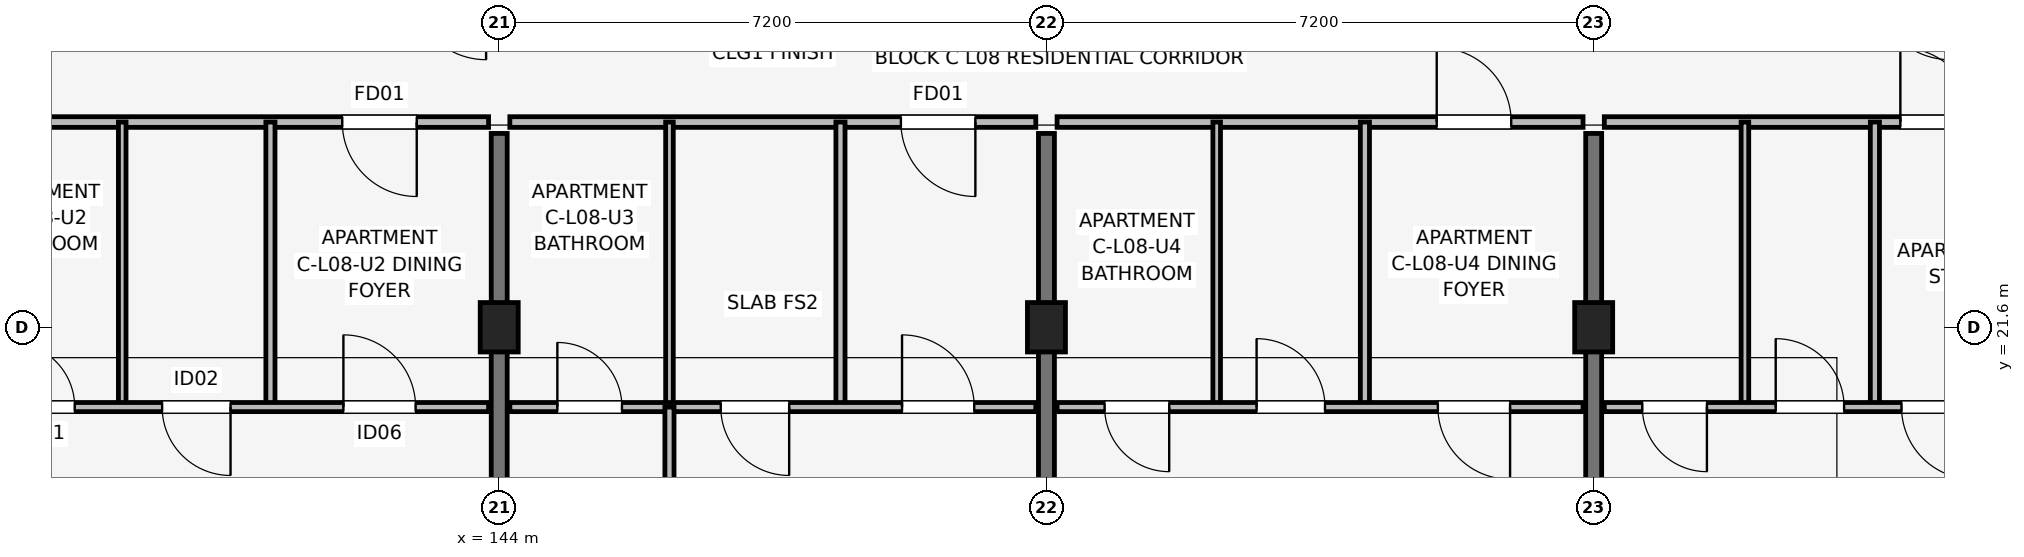
"""IFC4 building model, lengths in metres.
Left out: names, types, materials, properties, quantities, classifications, styles, units other than length and angle.
Written with IfcOpenShell. Run it as: python <this file> out.ifc"""

import sys

from ifc_helpers import new_model, si_unit, direction, frame, frame_2d, origin, origin_2d, place, context, subcontext, project, spatial, rectangle, extrude, element, fill, save


model = new_model("IFC4")
c1 = context("Model", 3, precision=1e-05, world=origin(), true_north=direction((0.0, 1.0)))
c2 = subcontext(c1, "Body", "Model", "MODEL_VIEW")
j1 = project(units=[si_unit("LENGTHUNIT", "METRE"), si_unit("PLANEANGLEUNIT", "RADIAN")], contexts=[c1])
p1 = place(None, origin())
s1 = spatial("IfcSite", under=j1, at=p1, CompositionType="ELEMENT")
p2 = place(p1, origin())
s2 = spatial("IfcBuilding", under=s1, at=p2, CompositionType="ELEMENT")
p3 = place(p2, frame((0.0, 0.0, 27.6)))
s3 = spatial("IfcBuildingStorey", under=s2, at=p3, CompositionType="ELEMENT", Elevation=27.6)
for number, where, z_axis, x_axis in (
    (1, (144.0, 21.6, 0.0), (0.0, 0.0, 1.0), (1.0, 0.0, 0.0)),
    (2, (151.2, 21.6, 0.0), (0.0, 0.0, 1.0), (1.0, 0.0, 0.0)),
    (3, (158.4, 21.6, 0.0), (0.0, 0.0, 1.0), (1.0, 0.0, 0.0)),
):
    element("IfcColumn", number, at=place(p3, frame(where, z_axis=z_axis, x_axis=x_axis)), inside=s3, PredefinedType="COLUMN", context=c2, shape_type="SweptSolid", body=[
        extrude(rectangle(XDim=0.5, YDim=0.65, at=origin_2d()), origin(), (0.0, 0.0, 1.0), 3.15),
    ])
for number, where, z_axis, x_axis in (
    (4, (144.0, 14.75, 0.0), (0.0, 0.0, 1.0), (0.0, 1.0, 0.0)),
    (5, (151.2, 14.75, 0.0), (0.0, 0.0, 1.0), (0.0, 1.0, 0.0)),
    (6, (158.4, 14.75, 0.0), (0.0, 0.0, 1.0), (0.0, 1.0, 0.0)),
):
    element("IfcWall", number, at=place(p3, frame(where, z_axis=z_axis, x_axis=x_axis)), inside=s3, PredefinedType="SHEAR", context=c2, shape_type="SweptSolid", body=[
        extrude(rectangle(XDim=9.4, YDim=0.21, at=frame_2d((4.7, 0.0))), origin(), (0.0, 0.0, 1.0), 3.15),
    ])
p4 = place(p3, frame((136.94, 24.3, 0.0), z_axis=(0.0, 0.0, 1.0), x_axis=(1.0, 0.0, 0.0)))
e7 = element("IfcWall", 7, at=p4, inside=s3, PredefinedType="PARTITIONING", context=c2, shape_type="SweptSolid", body=[
    extrude(rectangle(XDim=6.92, YDim=0.14, at=frame_2d((3.46, 0.0))), origin(), (0.0, 0.0, 1.0), 2.38),
])
p5 = place(p4, frame((5.975, 0.0, 0.0), z_axis=(0.0, 0.0, 1.0), x_axis=(-1.0, 0.0, 0.0)))
e8 = element("IfcOpeningElement", 8, at=p5, cuts=e7, PredefinedType="OPENING", context=c2, shape_type="SweptSolid", body=[
    extrude(rectangle(XDim=0.98, YDim=2.1, at=frame_2d((0.49, 1.05))), frame((0.0, 0.08, 0.0), z_axis=(0.0, -1.0, 0.0), x_axis=(1.0, 0.0, 0.0)), (0.0, 0.0, 1.0), 0.16),
])
p6 = place(p3, frame((139.04, 20.55, 0.0), z_axis=(0.0, 0.0, 1.0), x_axis=(0.0, 1.0, 0.0)))
e9 = element("IfcWall", 9, at=p6, inside=s3, PredefinedType="PARTITIONING", context=c2, shape_type="SweptSolid", body=[
    extrude(rectangle(XDim=3.75, YDim=0.1, at=frame_2d((1.875, 0.0))), origin(), (0.0, 0.0, 1.0), 2.38),
])
p7 = place(p3, frame((140.99, 20.55, 0.0), z_axis=(0.0, 0.0, 1.0), x_axis=(0.0, 1.0, 0.0)))
e10 = element("IfcWall", 10, at=p7, inside=s3, PredefinedType="PARTITIONING", context=c2, shape_type="SweptSolid", body=[
    extrude(rectangle(XDim=3.75, YDim=0.12, at=frame_2d((1.875, 0.0))), origin(), (0.0, 0.0, 1.0), 2.38),
])
p8 = place(p3, frame((136.94, 20.55, 0.0), z_axis=(0.0, 0.0, 1.0), x_axis=(1.0, 0.0, 0.0)))
e11 = element("IfcWall", 11, at=p8, inside=s3, PredefinedType="PARTITIONING", context=c2, shape_type="SweptSolid", body=[
    extrude(rectangle(XDim=6.92, YDim=0.12, at=frame_2d((3.46, 0.0))), origin(), (0.0, 0.0, 1.0), 2.38),
])
p9 = place(p8, frame((0.625, 0.0, 0.0)))
e12 = element("IfcOpeningElement", 12, at=p9, cuts=e11, PredefinedType="OPENING", context=c2, shape_type="SweptSolid", body=[
    extrude(rectangle(XDim=0.85, YDim=2.08, at=frame_2d((0.425, 1.04))), frame((0.0, 0.07, 0.0), z_axis=(0.0, -1.0, 0.0), x_axis=(1.0, 0.0, 0.0)), (0.0, 0.0, 1.0), 0.14),
])
p10 = place(p8, frame((3.525, 0.0, 0.0), z_axis=(0.0, 0.0, 1.0), x_axis=(-1.0, 0.0, 0.0)))
e13 = element("IfcOpeningElement", 13, at=p10, cuts=e11, PredefinedType="OPENING", context=c2, shape_type="SweptSolid", body=[
    extrude(rectangle(XDim=0.9, YDim=2.08, at=frame_2d((0.45, 1.04))), frame((0.0, 0.07, 0.0), z_axis=(0.0, -1.0, 0.0), x_axis=(1.0, 0.0, 0.0)), (0.0, 0.0, 1.0), 0.14),
])
p11 = place(p8, frame((5.01, 0.0, 0.0)))
e14 = element("IfcOpeningElement", 14, at=p11, cuts=e11, PredefinedType="OPENING", context=c2, shape_type="SweptSolid", body=[
    extrude(rectangle(XDim=0.95, YDim=2.08, at=frame_2d((0.475, 1.04))), frame((0.0, 0.07, 0.0), z_axis=(0.0, -1.0, 0.0), x_axis=(1.0, 0.0, 0.0)), (0.0, 0.0, 1.0), 0.14),
])
p12 = place(p3, frame((144.14, 24.3, 0.0), z_axis=(0.0, 0.0, 1.0), x_axis=(1.0, 0.0, 0.0)))
e15 = element("IfcWall", 15, at=p12, inside=s3, PredefinedType="PARTITIONING", context=c2, shape_type="SweptSolid", body=[
    extrude(rectangle(XDim=6.92, YDim=0.14, at=frame_2d((3.46, 0.0))), origin(), (0.0, 0.0, 1.0), 2.38),
])
p13 = place(p12, frame((6.125, 0.0, 0.0), z_axis=(0.0, 0.0, 1.0), x_axis=(-1.0, 0.0, 0.0)))
e16 = element("IfcOpeningElement", 16, at=p13, cuts=e15, PredefinedType="OPENING", context=c2, shape_type="SweptSolid", body=[
    extrude(rectangle(XDim=0.98, YDim=2.1, at=frame_2d((0.49, 1.05))), frame((0.0, 0.08, 0.0), z_axis=(0.0, -1.0, 0.0), x_axis=(1.0, 0.0, 0.0)), (0.0, 0.0, 1.0), 0.16),
])
p14 = place(p3, frame((146.24, 20.55, 0.0), z_axis=(0.0, 0.0, 1.0), x_axis=(0.0, 1.0, 0.0)))
e17 = element("IfcWall", 17, at=p14, inside=s3, PredefinedType="PARTITIONING", context=c2, shape_type="SweptSolid", body=[
    extrude(rectangle(XDim=3.75, YDim=0.1, at=frame_2d((1.875, 0.0))), origin(), (0.0, 0.0, 1.0), 2.38),
])
p15 = place(p3, frame((148.49, 20.55, 0.0), z_axis=(0.0, 0.0, 1.0), x_axis=(0.0, 1.0, 0.0)))
e18 = element("IfcWall", 18, at=p15, inside=s3, PredefinedType="PARTITIONING", context=c2, shape_type="SweptSolid", body=[
    extrude(rectangle(XDim=3.75, YDim=0.12, at=frame_2d((1.875, 0.0))), origin(), (0.0, 0.0, 1.0), 2.38),
])
p16 = place(p3, frame((144.14, 20.55, 0.0), z_axis=(0.0, 0.0, 1.0), x_axis=(1.0, 0.0, 0.0)))
e19 = element("IfcWall", 19, at=p16, inside=s3, PredefinedType="PARTITIONING", context=c2, shape_type="SweptSolid", body=[
    extrude(rectangle(XDim=6.92, YDim=0.12, at=frame_2d((3.46, 0.0))), origin(), (0.0, 0.0, 1.0), 2.38),
])
p17 = place(p16, frame((0.625, 0.0, 0.0)))
e20 = element("IfcOpeningElement", 20, at=p17, cuts=e19, PredefinedType="OPENING", context=c2, shape_type="SweptSolid", body=[
    extrude(rectangle(XDim=0.85, YDim=2.08, at=frame_2d((0.425, 1.04))), frame((0.0, 0.07, 0.0), z_axis=(0.0, -1.0, 0.0), x_axis=(1.0, 0.0, 0.0)), (0.0, 0.0, 1.0), 0.14),
])
p18 = place(p16, frame((3.675, 0.0, 0.0), z_axis=(0.0, 0.0, 1.0), x_axis=(-1.0, 0.0, 0.0)))
e21 = element("IfcOpeningElement", 21, at=p18, cuts=e19, PredefinedType="OPENING", context=c2, shape_type="SweptSolid", body=[
    extrude(rectangle(XDim=0.9, YDim=2.08, at=frame_2d((0.45, 1.04))), frame((0.0, 0.07, 0.0), z_axis=(0.0, -1.0, 0.0), x_axis=(1.0, 0.0, 0.0)), (0.0, 0.0, 1.0), 0.14),
])
p19 = place(p16, frame((5.16, 0.0, 0.0)))
e22 = element("IfcOpeningElement", 22, at=p19, cuts=e19, PredefinedType="OPENING", context=c2, shape_type="SweptSolid", body=[
    extrude(rectangle(XDim=0.95, YDim=2.08, at=frame_2d((0.475, 1.04))), frame((0.0, 0.07, 0.0), z_axis=(0.0, -1.0, 0.0), x_axis=(1.0, 0.0, 0.0)), (0.0, 0.0, 1.0), 0.14),
])
p20 = place(p3, frame((146.24, 14.7, 0.0), z_axis=(0.0, 0.0, 1.0), x_axis=(0.0, 1.0, 0.0)))
e23 = element("IfcWall", 23, at=p20, inside=s3, PredefinedType="PARTITIONING", context=c2, shape_type="SweptSolid", body=[
    extrude(rectangle(XDim=5.85, YDim=0.12, at=frame_2d((2.925, 0.0))), origin(), (0.0, 0.0, 1.0), 2.38),
])
p21 = place(p20, frame((3.375, 0.0, 0.0), z_axis=(0.0, 0.0, 1.0), x_axis=(-1.0, 0.0, 0.0)))
e24 = element("IfcOpeningElement", 24, at=p21, cuts=e23, PredefinedType="OPENING", context=c2, shape_type="SweptSolid", body=[
    extrude(rectangle(XDim=0.9, YDim=2.08, at=frame_2d((0.45, 1.04))), frame((0.0, 0.07, 0.0), z_axis=(0.0, -1.0, 0.0), x_axis=(1.0, 0.0, 0.0)), (0.0, 0.0, 1.0), 0.14),
])
p22 = place(p3, frame((151.34, 24.3, 0.0), z_axis=(0.0, 0.0, 1.0), x_axis=(1.0, 0.0, 0.0)))
e25 = element("IfcWall", 25, at=p22, inside=s3, PredefinedType="PARTITIONING", context=c2, shape_type="SweptSolid", body=[
    extrude(rectangle(XDim=6.92, YDim=0.14, at=frame_2d((3.46, 0.0))), origin(), (0.0, 0.0, 1.0), 2.38),
])
p23 = place(p22, frame((4.995, 0.0, 0.0)))
e26 = element("IfcOpeningElement", 26, at=p23, cuts=e25, PredefinedType="OPENING", context=c2, shape_type="SweptSolid", body=[
    extrude(rectangle(XDim=0.98, YDim=2.1, at=frame_2d((0.49, 1.05))), frame((0.0, 0.08, 0.0), z_axis=(0.0, -1.0, 0.0), x_axis=(1.0, 0.0, 0.0)), (0.0, 0.0, 1.0), 0.16),
])
p24 = place(p3, frame((153.44, 20.55, 0.0), z_axis=(0.0, 0.0, 1.0), x_axis=(0.0, 1.0, 0.0)))
e27 = element("IfcWall", 27, at=p24, inside=s3, PredefinedType="PARTITIONING", context=c2, shape_type="SweptSolid", body=[
    extrude(rectangle(XDim=3.75, YDim=0.1, at=frame_2d((1.875, 0.0))), origin(), (0.0, 0.0, 1.0), 2.38),
])
p25 = place(p3, frame((155.39, 20.55, 0.0), z_axis=(0.0, 0.0, 1.0), x_axis=(0.0, 1.0, 0.0)))
e28 = element("IfcWall", 28, at=p25, inside=s3, PredefinedType="PARTITIONING", context=c2, shape_type="SweptSolid", body=[
    extrude(rectangle(XDim=3.75, YDim=0.12, at=frame_2d((1.875, 0.0))), origin(), (0.0, 0.0, 1.0), 2.38),
])
p26 = place(p3, frame((151.34, 20.55, 0.0), z_axis=(0.0, 0.0, 1.0), x_axis=(1.0, 0.0, 0.0)))
e29 = element("IfcWall", 29, at=p26, inside=s3, PredefinedType="PARTITIONING", context=c2, shape_type="SweptSolid", body=[
    extrude(rectangle(XDim=6.92, YDim=0.12, at=frame_2d((3.46, 0.0))), origin(), (0.0, 0.0, 1.0), 2.38),
])
p27 = place(p26, frame((1.475, 0.0, 0.0), z_axis=(0.0, 0.0, 1.0), x_axis=(-1.0, 0.0, 0.0)))
e30 = element("IfcOpeningElement", 30, at=p27, cuts=e29, PredefinedType="OPENING", context=c2, shape_type="SweptSolid", body=[
    extrude(rectangle(XDim=0.85, YDim=2.08, at=frame_2d((0.425, 1.04))), frame((0.0, 0.07, 0.0), z_axis=(0.0, -1.0, 0.0), x_axis=(1.0, 0.0, 0.0)), (0.0, 0.0, 1.0), 0.14),
])
p28 = place(p26, frame((2.625, 0.0, 0.0)))
e31 = element("IfcOpeningElement", 31, at=p28, cuts=e29, PredefinedType="OPENING", context=c2, shape_type="SweptSolid", body=[
    extrude(rectangle(XDim=0.9, YDim=2.08, at=frame_2d((0.45, 1.04))), frame((0.0, 0.07, 0.0), z_axis=(0.0, -1.0, 0.0), x_axis=(1.0, 0.0, 0.0)), (0.0, 0.0, 1.0), 0.14),
])
p29 = place(p26, frame((5.96, 0.0, 0.0), z_axis=(0.0, 0.0, 1.0), x_axis=(-1.0, 0.0, 0.0)))
e32 = element("IfcOpeningElement", 32, at=p29, cuts=e29, PredefinedType="OPENING", context=c2, shape_type="SweptSolid", body=[
    extrude(rectangle(XDim=0.95, YDim=2.08, at=frame_2d((0.475, 1.04))), frame((0.0, 0.07, 0.0), z_axis=(0.0, -1.0, 0.0), x_axis=(1.0, 0.0, 0.0)), (0.0, 0.0, 1.0), 0.14),
])
p30 = place(p3, frame((158.54, 24.3, 0.0), z_axis=(0.0, 0.0, 1.0), x_axis=(1.0, 0.0, 0.0)))
e33 = element("IfcWall", 33, at=p30, inside=s3, PredefinedType="PARTITIONING", context=c2, shape_type="SweptSolid", body=[
    extrude(rectangle(XDim=6.92, YDim=0.14, at=frame_2d((3.46, 0.0))), origin(), (0.0, 0.0, 1.0), 2.38),
])
p31 = place(p30, frame((3.895, 0.0, 0.0)))
e34 = element("IfcOpeningElement", 34, at=p31, cuts=e33, PredefinedType="OPENING", context=c2, shape_type="SweptSolid", body=[
    extrude(rectangle(XDim=0.98, YDim=2.1, at=frame_2d((0.49, 1.05))), frame((0.0, 0.08, 0.0), z_axis=(0.0, -1.0, 0.0), x_axis=(1.0, 0.0, 0.0)), (0.0, 0.0, 1.0), 0.16),
])
p32 = place(p3, frame((160.39, 20.55, 0.0), z_axis=(0.0, 0.0, 1.0), x_axis=(0.0, 1.0, 0.0)))
e35 = element("IfcWall", 35, at=p32, inside=s3, PredefinedType="PARTITIONING", context=c2, shape_type="SweptSolid", body=[
    extrude(rectangle(XDim=3.75, YDim=0.1, at=frame_2d((1.875, 0.0))), origin(), (0.0, 0.0, 1.0), 2.38),
])
p33 = place(p3, frame((162.1, 20.55, 0.0), z_axis=(0.0, 0.0, 1.0), x_axis=(0.0, 1.0, 0.0)))
e36 = element("IfcWall", 36, at=p33, inside=s3, PredefinedType="PARTITIONING", context=c2, shape_type="SweptSolid", body=[
    extrude(rectangle(XDim=3.75, YDim=0.12, at=frame_2d((1.875, 0.0))), origin(), (0.0, 0.0, 1.0), 2.38),
])
p34 = place(p3, frame((158.54, 20.55, 0.0), z_axis=(0.0, 0.0, 1.0), x_axis=(1.0, 0.0, 0.0)))
e37 = element("IfcWall", 37, at=p34, inside=s3, PredefinedType="PARTITIONING", context=c2, shape_type="SweptSolid", body=[
    extrude(rectangle(XDim=6.92, YDim=0.12, at=frame_2d((3.46, 0.0))), origin(), (0.0, 0.0, 1.0), 2.38),
])
p35 = place(p34, frame((1.35, 0.0, 0.0), z_axis=(0.0, 0.0, 1.0), x_axis=(-1.0, 0.0, 0.0)))
e38 = element("IfcOpeningElement", 38, at=p35, cuts=e37, PredefinedType="OPENING", context=c2, shape_type="SweptSolid", body=[
    extrude(rectangle(XDim=0.85, YDim=2.08, at=frame_2d((0.425, 1.04))), frame((0.0, 0.07, 0.0), z_axis=(0.0, -1.0, 0.0), x_axis=(1.0, 0.0, 0.0)), (0.0, 0.0, 1.0), 0.14),
])
p36 = place(p34, frame((2.255, 0.0, 0.0)))
e39 = element("IfcOpeningElement", 39, at=p36, cuts=e37, PredefinedType="OPENING", context=c2, shape_type="SweptSolid", body=[
    extrude(rectangle(XDim=0.9, YDim=2.08, at=frame_2d((0.45, 1.04))), frame((0.0, 0.07, 0.0), z_axis=(0.0, -1.0, 0.0), x_axis=(1.0, 0.0, 0.0)), (0.0, 0.0, 1.0), 0.14),
])
p37 = place(p34, frame((4.86, 0.0, 0.0), z_axis=(0.0, 0.0, 1.0), x_axis=(-1.0, 0.0, 0.0)))
e40 = element("IfcOpeningElement", 40, at=p37, cuts=e37, PredefinedType="OPENING", context=c2, shape_type="SweptSolid", body=[
    extrude(rectangle(XDim=0.95, YDim=2.08, at=frame_2d((0.475, 1.04))), frame((0.0, 0.07, 0.0), z_axis=(0.0, -1.0, 0.0), x_axis=(1.0, 0.0, 0.0)), (0.0, 0.0, 1.0), 0.14),
])
p38 = place(p5, origin())
e41 = element("IfcDoor", 41, at=p38, inside=s3, OperationType="SINGLE_SWING_RIGHT", PredefinedType="DOOR", context=c2, shape_type="SweptSolid", body=[
    extrude(rectangle(XDim=0.98, YDim=2.1, at=frame_2d((0.49, 1.05))), frame((0.0, 0.025, 0.0), z_axis=(0.0, -1.0, 0.0), x_axis=(1.0, 0.0, 0.0)), (0.0, 0.0, 1.0), 0.05),
])
fill(e8, e41)
p39 = place(p9, origin())
e42 = element("IfcDoor", 42, at=p39, inside=s3, OperationType="SINGLE_SWING_LEFT", PredefinedType="DOOR", context=c2, shape_type="SweptSolid", body=[
    extrude(rectangle(XDim=0.85, YDim=2.08, at=frame_2d((0.425, 1.04))), frame((0.0, 0.025, 0.0), z_axis=(0.0, -1.0, 0.0), x_axis=(1.0, 0.0, 0.0)), (0.0, 0.0, 1.0), 0.05),
])
fill(e12, e42)
p40 = place(p10, origin())
e43 = element("IfcDoor", 43, at=p40, inside=s3, OperationType="SINGLE_SWING_RIGHT", PredefinedType="DOOR", context=c2, shape_type="SweptSolid", body=[
    extrude(rectangle(XDim=0.9, YDim=2.08, at=frame_2d((0.45, 1.04))), frame((0.0, 0.025, 0.0), z_axis=(0.0, -1.0, 0.0), x_axis=(1.0, 0.0, 0.0)), (0.0, 0.0, 1.0), 0.05),
])
fill(e13, e43)
p41 = place(p11, origin())
e44 = element("IfcDoor", 44, at=p41, inside=s3, OperationType="SINGLE_SWING_LEFT", PredefinedType="DOOR", context=c2, shape_type="SweptSolid", body=[
    extrude(rectangle(XDim=0.95, YDim=2.08, at=frame_2d((0.475, 1.04))), frame((0.0, 0.025, 0.0), z_axis=(0.0, -1.0, 0.0), x_axis=(1.0, 0.0, 0.0)), (0.0, 0.0, 1.0), 0.05),
])
fill(e14, e44)
p42 = place(p13, origin())
e45 = element("IfcDoor", 45, at=p42, inside=s3, OperationType="SINGLE_SWING_RIGHT", PredefinedType="DOOR", context=c2, shape_type="SweptSolid", body=[
    extrude(rectangle(XDim=0.98, YDim=2.1, at=frame_2d((0.49, 1.05))), frame((0.0, 0.025, 0.0), z_axis=(0.0, -1.0, 0.0), x_axis=(1.0, 0.0, 0.0)), (0.0, 0.0, 1.0), 0.05),
])
fill(e16, e45)
p43 = place(p17, origin())
e46 = element("IfcDoor", 46, at=p43, inside=s3, OperationType="SINGLE_SWING_LEFT", PredefinedType="DOOR", context=c2, shape_type="SweptSolid", body=[
    extrude(rectangle(XDim=0.85, YDim=2.08, at=frame_2d((0.425, 1.04))), frame((0.0, 0.025, 0.0), z_axis=(0.0, -1.0, 0.0), x_axis=(1.0, 0.0, 0.0)), (0.0, 0.0, 1.0), 0.05),
])
fill(e20, e46)
p44 = place(p18, origin())
e47 = element("IfcDoor", 47, at=p44, inside=s3, OperationType="SINGLE_SWING_RIGHT", PredefinedType="DOOR", context=c2, shape_type="SweptSolid", body=[
    extrude(rectangle(XDim=0.9, YDim=2.08, at=frame_2d((0.45, 1.04))), frame((0.0, 0.025, 0.0), z_axis=(0.0, -1.0, 0.0), x_axis=(1.0, 0.0, 0.0)), (0.0, 0.0, 1.0), 0.05),
])
fill(e21, e47)
p45 = place(p19, origin())
e48 = element("IfcDoor", 48, at=p45, inside=s3, OperationType="SINGLE_SWING_LEFT", PredefinedType="DOOR", context=c2, shape_type="SweptSolid", body=[
    extrude(rectangle(XDim=0.95, YDim=2.08, at=frame_2d((0.475, 1.04))), frame((0.0, 0.025, 0.0), z_axis=(0.0, -1.0, 0.0), x_axis=(1.0, 0.0, 0.0)), (0.0, 0.0, 1.0), 0.05),
])
fill(e22, e48)
p46 = place(p23, origin())
e49 = element("IfcDoor", 49, at=p46, inside=s3, OperationType="SINGLE_SWING_LEFT", PredefinedType="DOOR", context=c2, shape_type="SweptSolid", body=[
    extrude(rectangle(XDim=0.98, YDim=2.1, at=frame_2d((0.49, 1.05))), frame((0.0, 0.025, 0.0), z_axis=(0.0, -1.0, 0.0), x_axis=(1.0, 0.0, 0.0)), (0.0, 0.0, 1.0), 0.05),
])
fill(e26, e49)
p47 = place(p27, origin())
e50 = element("IfcDoor", 50, at=p47, inside=s3, OperationType="SINGLE_SWING_RIGHT", PredefinedType="DOOR", context=c2, shape_type="SweptSolid", body=[
    extrude(rectangle(XDim=0.85, YDim=2.08, at=frame_2d((0.425, 1.04))), frame((0.0, 0.025, 0.0), z_axis=(0.0, -1.0, 0.0), x_axis=(1.0, 0.0, 0.0)), (0.0, 0.0, 1.0), 0.05),
])
fill(e30, e50)
p48 = place(p28, origin())
e51 = element("IfcDoor", 51, at=p48, inside=s3, OperationType="SINGLE_SWING_LEFT", PredefinedType="DOOR", context=c2, shape_type="SweptSolid", body=[
    extrude(rectangle(XDim=0.9, YDim=2.08, at=frame_2d((0.45, 1.04))), frame((0.0, 0.025, 0.0), z_axis=(0.0, -1.0, 0.0), x_axis=(1.0, 0.0, 0.0)), (0.0, 0.0, 1.0), 0.05),
])
fill(e31, e51)
p49 = place(p29, origin())
e52 = element("IfcDoor", 52, at=p49, inside=s3, OperationType="SINGLE_SWING_RIGHT", PredefinedType="DOOR", context=c2, shape_type="SweptSolid", body=[
    extrude(rectangle(XDim=0.95, YDim=2.08, at=frame_2d((0.475, 1.04))), frame((0.0, 0.025, 0.0), z_axis=(0.0, -1.0, 0.0), x_axis=(1.0, 0.0, 0.0)), (0.0, 0.0, 1.0), 0.05),
])
fill(e32, e52)
p50 = place(p31, origin())
e53 = element("IfcDoor", 53, at=p50, inside=s3, OperationType="SINGLE_SWING_LEFT", PredefinedType="DOOR", context=c2, shape_type="SweptSolid", body=[
    extrude(rectangle(XDim=0.98, YDim=2.1, at=frame_2d((0.49, 1.05))), frame((0.0, 0.025, 0.0), z_axis=(0.0, -1.0, 0.0), x_axis=(1.0, 0.0, 0.0)), (0.0, 0.0, 1.0), 0.05),
])
fill(e34, e53)
p51 = place(p35, origin())
e54 = element("IfcDoor", 54, at=p51, inside=s3, OperationType="SINGLE_SWING_RIGHT", PredefinedType="DOOR", context=c2, shape_type="SweptSolid", body=[
    extrude(rectangle(XDim=0.85, YDim=2.08, at=frame_2d((0.425, 1.04))), frame((0.0, 0.025, 0.0), z_axis=(0.0, -1.0, 0.0), x_axis=(1.0, 0.0, 0.0)), (0.0, 0.0, 1.0), 0.05),
])
fill(e38, e54)
p52 = place(p36, origin())
e55 = element("IfcDoor", 55, at=p52, inside=s3, OperationType="SINGLE_SWING_LEFT", PredefinedType="DOOR", context=c2, shape_type="SweptSolid", body=[
    extrude(rectangle(XDim=0.9, YDim=2.08, at=frame_2d((0.45, 1.04))), frame((0.0, 0.025, 0.0), z_axis=(0.0, -1.0, 0.0), x_axis=(1.0, 0.0, 0.0)), (0.0, 0.0, 1.0), 0.05),
])
fill(e39, e55)
p53 = place(p37, origin())
e56 = element("IfcDoor", 56, at=p53, inside=s3, OperationType="SINGLE_SWING_RIGHT", PredefinedType="DOOR", context=c2, shape_type="SweptSolid", body=[
    extrude(rectangle(XDim=0.95, YDim=2.08, at=frame_2d((0.475, 1.04))), frame((0.0, 0.025, 0.0), z_axis=(0.0, -1.0, 0.0), x_axis=(1.0, 0.0, 0.0)), (0.0, 0.0, 1.0), 0.05),
])
fill(e40, e56)
save(model, sys.argv[1])
